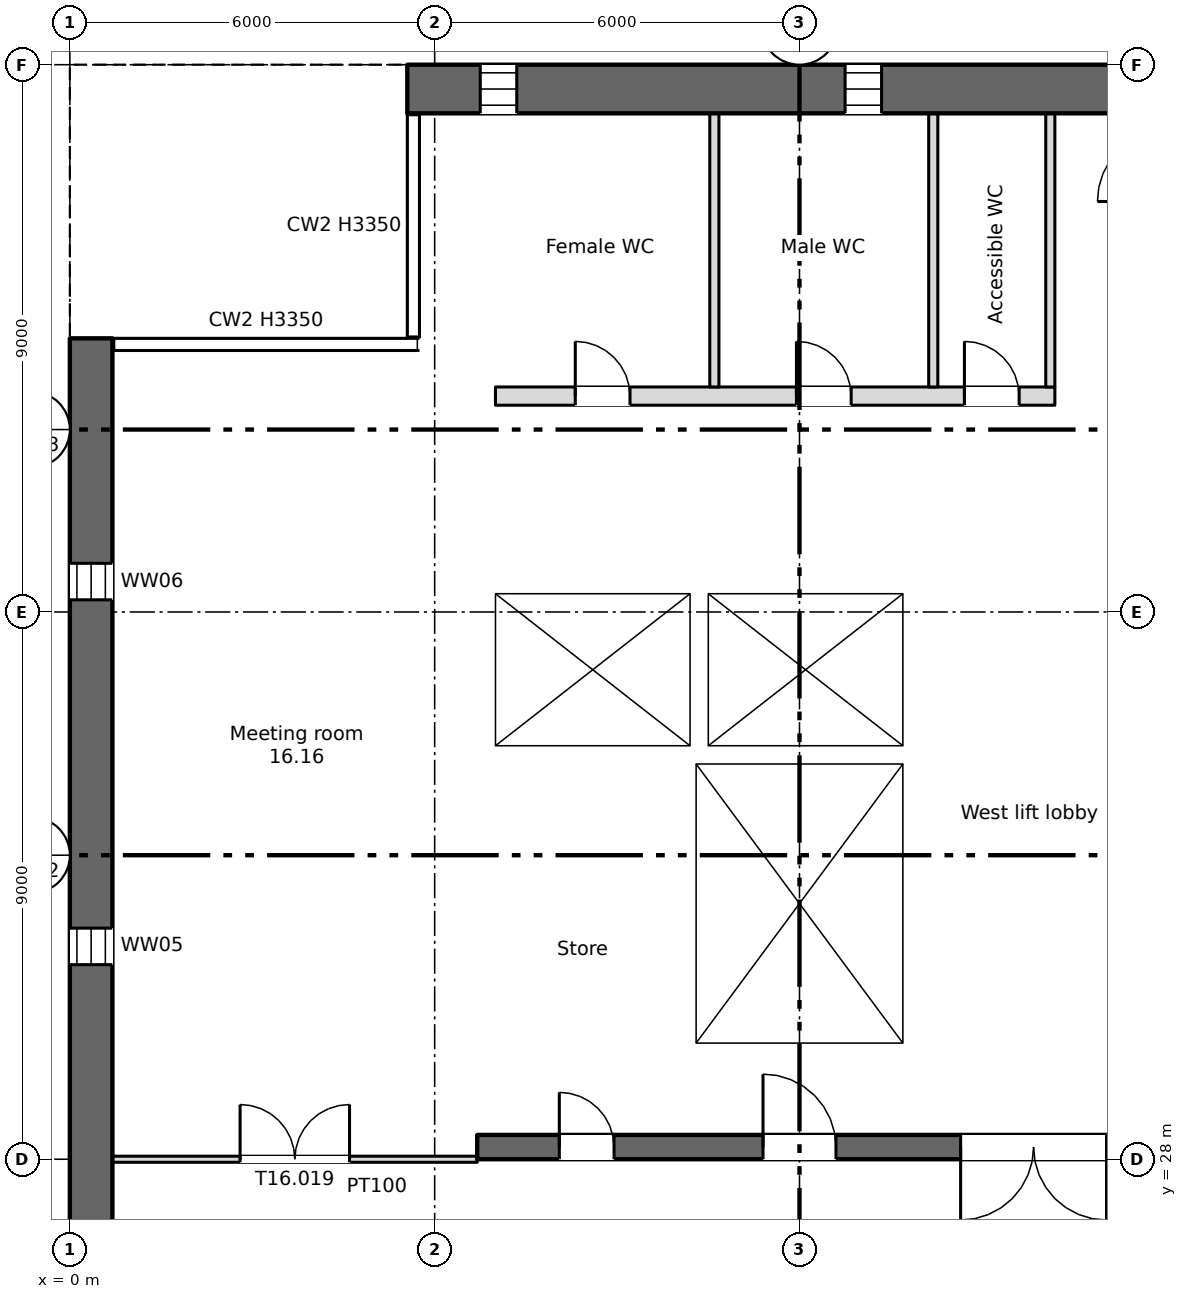
"""IFC4 building model, lengths in metres.
Left out: names, types, materials, properties, quantities, classifications, styles, units other than length and angle.
Written with IfcOpenShell. Run it as: python <this file> out.ifc"""

import sys

from ifc_helpers import new_model, si_unit, direction, frame, frame_2d, origin, place, context, subcontext, project, spatial, rectangle, extrude, element, fill, save


model = new_model("IFC4")
c1 = context("Model", 3, precision=1e-05, world=origin(), true_north=direction((0.0, 1.0)))
c2 = subcontext(c1, "Body", "Model", "MODEL_VIEW")
j1 = project(units=[si_unit("LENGTHUNIT", "METRE"), si_unit("PLANEANGLEUNIT", "RADIAN")], contexts=[c1])
p1 = place(None, origin())
s1 = spatial("IfcSite", under=j1, at=p1, CompositionType="ELEMENT")
p2 = place(p1, origin())
s2 = spatial("IfcBuilding", under=s1, at=p2, CompositionType="ELEMENT")
p3 = place(p2, frame((0.0, 0.0, 98.75)))
s3 = spatial("IfcBuildingStorey", under=s2, at=p3, CompositionType="ELEMENT", Elevation=98.75)
p4 = place(p3, frame((0.35, 6.0, 0.0), z_axis=(0.0, 0.0, 1.0), x_axis=(0.0, 1.0, 0.0)))
e1 = element("IfcWall", 1, at=p4, inside=s3, PredefinedType="SHEAR", context=c2, shape_type="SweptSolid", body=[
    extrude(rectangle(XDim=35.5, YDim=0.7, at=frame_2d((17.75, 0.0))), origin(), (0.0, 0.0, 1.0), 3.35),
])
p5 = place(p4, frame((1.2, 0.0, 0.6)))
e2 = element("IfcOpeningElement", 2, at=p5, cuts=e1, PredefinedType="OPENING", context=c2, shape_type="SweptSolid", body=[
    extrude(rectangle(XDim=0.6, YDim=2.4, at=frame_2d((0.3, 1.2))), frame((0.0, 0.36, 0.0), z_axis=(0.0, -1.0, 0.0), x_axis=(1.0, 0.0, 0.0)), (0.0, 0.0, 1.0), 0.72),
])
p6 = place(p4, frame((7.2, 0.0, 0.6)))
e3 = element("IfcOpeningElement", 3, at=p6, cuts=e1, PredefinedType="OPENING", context=c2, shape_type="SweptSolid", body=[
    extrude(rectangle(XDim=0.6, YDim=2.4, at=frame_2d((0.3, 1.2))), frame((0.0, 0.36, 0.0), z_axis=(0.0, -1.0, 0.0), x_axis=(1.0, 0.0, 0.0)), (0.0, 0.0, 1.0), 0.72),
])
p7 = place(p4, frame((13.2, 0.0, 0.6)))
e4 = element("IfcOpeningElement", 4, at=p7, cuts=e1, PredefinedType="OPENING", context=c2, shape_type="SweptSolid", body=[
    extrude(rectangle(XDim=0.6, YDim=2.4, at=frame_2d((0.3, 1.2))), frame((0.0, 0.36, 0.0), z_axis=(0.0, -1.0, 0.0), x_axis=(1.0, 0.0, 0.0)), (0.0, 0.0, 1.0), 0.72),
])
p8 = place(p4, frame((19.2, 0.0, 0.6)))
e5 = element("IfcOpeningElement", 5, at=p8, cuts=e1, PredefinedType="OPENING", context=c2, shape_type="SweptSolid", body=[
    extrude(rectangle(XDim=0.6, YDim=2.4, at=frame_2d((0.3, 1.2))), frame((0.0, 0.36, 0.0), z_axis=(0.0, -1.0, 0.0), x_axis=(1.0, 0.0, 0.0)), (0.0, 0.0, 1.0), 0.72),
])
p9 = place(p4, frame((25.2, 0.0, 0.6)))
e6 = element("IfcOpeningElement", 6, at=p9, cuts=e1, PredefinedType="OPENING", context=c2, shape_type="SweptSolid", body=[
    extrude(rectangle(XDim=0.6, YDim=2.4, at=frame_2d((0.3, 1.2))), frame((0.0, 0.36, 0.0), z_axis=(0.0, -1.0, 0.0), x_axis=(1.0, 0.0, 0.0)), (0.0, 0.0, 1.0), 0.72),
])
p10 = place(p4, frame((31.2, 0.0, 0.6)))
e7 = element("IfcOpeningElement", 7, at=p10, cuts=e1, PredefinedType="OPENING", context=c2, shape_type="SweptSolid", body=[
    extrude(rectangle(XDim=0.6, YDim=2.4, at=frame_2d((0.3, 1.2))), frame((0.0, 0.36, 0.0), z_axis=(0.0, -1.0, 0.0), x_axis=(1.0, 0.0, 0.0)), (0.0, 0.0, 1.0), 0.72),
])
p11 = place(p3, frame((5.55, 45.6, 0.0), z_axis=(0.0, 0.0, 1.0), x_axis=(1.0, 0.0, 0.0)))
e8 = element("IfcWall", 8, at=p11, inside=s3, PredefinedType="SHEAR", context=c2, shape_type="SweptSolid", body=[
    extrude(rectangle(XDim=60.9, YDim=0.8, at=frame_2d((30.45, 0.0))), origin(), (0.0, 0.0, 1.0), 3.35),
])
p12 = place(p11, frame((1.2, 0.0, 0.6)))
e9 = element("IfcOpeningElement", 9, at=p12, cuts=e8, PredefinedType="OPENING", context=c2, shape_type="SweptSolid", body=[
    extrude(rectangle(XDim=0.6, YDim=2.4, at=frame_2d((0.3, 1.2))), frame((0.0, 0.41, 0.0), z_axis=(0.0, -1.0, 0.0), x_axis=(1.0, 0.0, 0.0)), (0.0, 0.0, 1.0), 0.82),
])
p13 = place(p11, frame((7.2, 0.0, 0.6)))
e10 = element("IfcOpeningElement", 10, at=p13, cuts=e8, PredefinedType="OPENING", context=c2, shape_type="SweptSolid", body=[
    extrude(rectangle(XDim=0.6, YDim=2.4, at=frame_2d((0.3, 1.2))), frame((0.0, 0.41, 0.0), z_axis=(0.0, -1.0, 0.0), x_axis=(1.0, 0.0, 0.0)), (0.0, 0.0, 1.0), 0.82),
])
p14 = place(p3, frame((6.7, 28.2, 0.0), z_axis=(0.0, 0.0, 1.0), x_axis=(1.0, 0.0, 0.0)))
e11 = element("IfcWall", 11, at=p14, inside=s3, PredefinedType="SHEAR", context=c2, shape_type="SweptSolid", body=[
    extrude(rectangle(XDim=57.8, YDim=0.4, at=frame_2d((28.9, 0.0))), origin(), (0.0, 0.0, 1.0), 3.35),
])
p15 = place(p14, frame((13.85, 0.0, 0.0)))
e12 = element("IfcOpeningElement", 12, at=p15, cuts=e11, PredefinedType="OPENING", context=c2, shape_type="SweptSolid", body=[
    extrude(rectangle(XDim=0.9, YDim=2.1, at=frame_2d((0.45, 1.05))), frame((0.0, 0.21, 0.0), z_axis=(0.0, -1.0, 0.0), x_axis=(1.0, 0.0, 0.0)), (0.0, 0.0, 1.0), 0.42),
])
p16 = place(p14, frame((48.562, 0.0, 0.0)))
e13 = element("IfcOpeningElement", 13, at=p16, cuts=e11, PredefinedType="OPENING", context=c2, shape_type="SweptSolid", body=[
    extrude(rectangle(XDim=0.9, YDim=2.1, at=frame_2d((0.45, 1.05))), frame((0.0, 0.21, 0.0), z_axis=(0.0, -1.0, 0.0), x_axis=(1.0, 0.0, 0.0)), (0.0, 0.0, 1.0), 0.42),
])
p17 = place(p14, frame((51.137, 0.0, 0.0)))
e14 = element("IfcOpeningElement", 14, at=p17, cuts=e11, PredefinedType="OPENING", context=c2, shape_type="SweptSolid", body=[
    extrude(rectangle(XDim=0.9, YDim=2.1, at=frame_2d((0.45, 1.05))), frame((0.0, 0.21, 0.0), z_axis=(0.0, -1.0, 0.0), x_axis=(1.0, 0.0, 0.0)), (0.0, 0.0, 1.0), 0.42),
])
p18 = place(p14, frame((1.35, 0.0, 0.0)))
e15 = element("IfcOpeningElement", 15, at=p18, cuts=e11, PredefinedType="OPENING", context=c2, shape_type="SweptSolid", body=[
    extrude(rectangle(XDim=0.9, YDim=2.1, at=frame_2d((0.45, 1.05))), frame((0.0, 0.21, 0.0), z_axis=(0.0, -1.0, 0.0), x_axis=(1.0, 0.0, 0.0)), (0.0, 0.0, 1.0), 0.42),
])
p19 = place(p14, frame((4.7, 0.0, 0.0)))
e16 = element("IfcOpeningElement", 16, at=p19, cuts=e11, PredefinedType="OPENING", context=c2, shape_type="SweptSolid", body=[
    extrude(rectangle(XDim=1.2, YDim=2.1, at=frame_2d((0.6, 1.05))), frame((0.0, 0.21, 0.0), z_axis=(0.0, -1.0, 0.0), x_axis=(1.0, 0.0, 0.0)), (0.0, 0.0, 1.0), 0.42),
])
p20 = place(p14, frame((31.7, 0.0, 0.0)))
e17 = element("IfcOpeningElement", 17, at=p20, cuts=e11, PredefinedType="OPENING", context=c2, shape_type="SweptSolid", body=[
    extrude(rectangle(XDim=1.2, YDim=2.1, at=frame_2d((0.6, 1.05))), frame((0.0, 0.21, 0.0), z_axis=(0.0, -1.0, 0.0), x_axis=(1.0, 0.0, 0.0)), (0.0, 0.0, 1.0), 0.42),
])
p21 = place(p14, frame((55.2, 0.0, 0.0)))
e18 = element("IfcOpeningElement", 18, at=p21, cuts=e11, PredefinedType="OPENING", context=c2, shape_type="SweptSolid", body=[
    extrude(rectangle(XDim=1.2, YDim=2.1, at=frame_2d((0.6, 1.05))), frame((0.0, 0.21, 0.0), z_axis=(0.0, -1.0, 0.0), x_axis=(1.0, 0.0, 0.0)), (0.0, 0.0, 1.0), 0.42),
])
p22 = place(p14, frame((21.7, 0.0, 0.0)))
e19 = element("IfcOpeningElement", 19, at=p22, cuts=e11, PredefinedType="OPENING", context=c2, shape_type="SweptSolid", body=[
    extrude(rectangle(XDim=1.2, YDim=2.1, at=frame_2d((0.6, 1.05))), frame((0.0, 0.21, 0.0), z_axis=(0.0, -1.0, 0.0), x_axis=(1.0, 0.0, 0.0)), (0.0, 0.0, 1.0), 0.42),
])
p23 = place(p14, frame((41.7, 0.0, 0.0)))
e20 = element("IfcOpeningElement", 20, at=p23, cuts=e11, PredefinedType="OPENING", context=c2, shape_type="SweptSolid", body=[
    extrude(rectangle(XDim=1.2, YDim=2.1, at=frame_2d((0.6, 1.05))), frame((0.0, 0.21, 0.0), z_axis=(0.0, -1.0, 0.0), x_axis=(1.0, 0.0, 0.0)), (0.0, 0.0, 1.0), 0.42),
])
p24 = place(p14, frame((24.85, 0.0, 0.0)))
e21 = element("IfcOpeningElement", 21, at=p24, cuts=e11, PredefinedType="OPENING", context=c2, shape_type="SweptSolid", body=[
    extrude(rectangle(XDim=2.4, YDim=2.1, at=frame_2d((1.2, 1.05))), frame((0.0, 0.21, 0.0), z_axis=(0.0, -1.0, 0.0), x_axis=(1.0, 0.0, 0.0)), (0.0, 0.0, 1.0), 0.42),
])
p25 = place(p14, frame((37.35, 0.0, 0.0)))
e22 = element("IfcOpeningElement", 22, at=p25, cuts=e11, PredefinedType="OPENING", context=c2, shape_type="SweptSolid", body=[
    extrude(rectangle(XDim=2.4, YDim=2.1, at=frame_2d((1.2, 1.05))), frame((0.0, 0.21, 0.0), z_axis=(0.0, -1.0, 0.0), x_axis=(1.0, 0.0, 0.0)), (0.0, 0.0, 1.0), 0.42),
])
p26 = place(p14, frame((7.95, 0.0, 0.0)))
e23 = element("IfcOpeningElement", 23, at=p26, cuts=e11, PredefinedType="OPENING", context=c2, shape_type="SweptSolid", body=[
    extrude(rectangle(XDim=2.4, YDim=2.1, at=frame_2d((1.2, 1.05))), frame((0.0, 0.21, 0.0), z_axis=(0.0, -1.0, 0.0), x_axis=(1.0, 0.0, 0.0)), (0.0, 0.0, 1.0), 0.42),
])
p27 = place(p14, frame((28.85, 0.0, 0.0)))
e24 = element("IfcOpeningElement", 24, at=p27, cuts=e11, PredefinedType="OPENING", context=c2, shape_type="SweptSolid", body=[
    extrude(rectangle(XDim=0.9, YDim=2.1, at=frame_2d((0.45, 1.05))), frame((0.0, 0.21, 0.0), z_axis=(0.0, -1.0, 0.0), x_axis=(1.0, 0.0, 0.0)), (0.0, 0.0, 1.0), 0.42),
])
p28 = place(p14, frame((34.85, 0.0, 0.0)))
e25 = element("IfcOpeningElement", 25, at=p28, cuts=e11, PredefinedType="OPENING", context=c2, shape_type="SweptSolid", body=[
    extrude(rectangle(XDim=0.9, YDim=2.1, at=frame_2d((0.45, 1.05))), frame((0.0, 0.21, 0.0), z_axis=(0.0, -1.0, 0.0), x_axis=(1.0, 0.0, 0.0)), (0.0, 0.0, 1.0), 0.42),
])
p29 = place(p3, frame((6.85, 28.4, 0.0), z_axis=(0.0, 0.0, 1.0), x_axis=(0.0, 1.0, 0.0)))
e26 = element("IfcWall", 26, at=p29, inside=s3, PredefinedType="SHEAR", context=c2, shape_type="SweptSolid", body=[
    extrude(rectangle(XDim=16.8, YDim=0.3, at=frame_2d((8.4, 0.0))), origin(), (0.0, 0.0, 1.0), 3.35),
])
for number, where, z_axis, x_axis in (
    (27, (10.15, 28.4, 0.0), (0.0, 0.0, 1.0), (0.0, 1.0, 0.0)),
    (28, (13.85, 28.4, 0.0), (0.0, 0.0, 1.0), (0.0, 1.0, 0.0)),
):
    element("IfcWall", number, at=place(p3, frame(where, z_axis=z_axis, x_axis=x_axis)), inside=s3, PredefinedType="SHEAR", context=c2, shape_type="SweptSolid", body=[
        extrude(rectangle(XDim=6.1, YDim=0.3, at=frame_2d((3.05, 0.0))), origin(), (0.0, 0.0, 1.0), 3.35),
    ])
for number, where, z_axis, x_axis in (
    (29, (7.0, 34.65, 0.0), (0.0, 0.0, 1.0), (1.0, 0.0, 0.0)),
    (30, (7.0, 37.45, 0.0), (0.0, 0.0, 1.0), (1.0, 0.0, 0.0)),
):
    element("IfcWall", number, at=place(p3, frame(where, z_axis=z_axis, x_axis=x_axis)), inside=s3, PredefinedType="SHEAR", context=c2, shape_type="SweptSolid", body=[
        extrude(rectangle(XDim=7.0, YDim=0.3, at=frame_2d((3.5, 0.0))), origin(), (0.0, 0.0, 1.0), 3.35),
    ])
p30 = place(p3, frame((13.85, 34.8, 0.0), z_axis=(0.0, 0.0, 1.0), x_axis=(0.0, 1.0, 0.0)))
e31 = element("IfcWall", 31, at=p30, inside=s3, PredefinedType="SHEAR", context=c2, shape_type="SweptSolid", body=[
    extrude(rectangle(XDim=2.5, YDim=0.3, at=frame_2d((1.25, 0.0))), origin(), (0.0, 0.0, 1.0), 3.35),
])
p31 = place(p3, frame((7.0, 40.55, 0.0), z_axis=(0.0, 0.0, 1.0), x_axis=(1.0, 0.0, 0.0)))
e32 = element("IfcWall", 32, at=p31, inside=s3, PredefinedType="PARTITIONING", context=c2, shape_type="SweptSolid", body=[
    extrude(rectangle(XDim=9.2, YDim=0.3, at=frame_2d((4.6, 0.0))), origin(), (0.0, 0.0, 1.0), 3.35),
])
p32 = place(p31, frame((1.312, 0.0, 0.0)))
e33 = element("IfcOpeningElement", 33, at=p32, cuts=e32, PredefinedType="OPENING", context=c2, shape_type="SweptSolid", body=[
    extrude(rectangle(XDim=0.9, YDim=2.1, at=frame_2d((0.45, 1.05))), frame((0.0, 0.16, 0.0), z_axis=(0.0, -1.0, 0.0), x_axis=(1.0, 0.0, 0.0)), (0.0, 0.0, 1.0), 0.32),
])
p33 = place(p31, frame((4.95, 0.0, 0.0)))
e34 = element("IfcOpeningElement", 34, at=p33, cuts=e32, PredefinedType="OPENING", context=c2, shape_type="SweptSolid", body=[
    extrude(rectangle(XDim=0.9, YDim=2.1, at=frame_2d((0.45, 1.05))), frame((0.0, 0.16, 0.0), z_axis=(0.0, -1.0, 0.0), x_axis=(1.0, 0.0, 0.0)), (0.0, 0.0, 1.0), 0.32),
])
p34 = place(p31, frame((7.712, 0.0, 0.0)))
e35 = element("IfcOpeningElement", 35, at=p34, cuts=e32, PredefinedType="OPENING", context=c2, shape_type="SweptSolid", body=[
    extrude(rectangle(XDim=0.9, YDim=2.1, at=frame_2d((0.45, 1.05))), frame((0.0, 0.16, 0.0), z_axis=(0.0, -1.0, 0.0), x_axis=(1.0, 0.0, 0.0)), (0.0, 0.0, 1.0), 0.32),
])
p35 = place(p3, frame((10.35, 34.8, 0.0), z_axis=(0.0, 0.0, 1.0), x_axis=(0.0, 1.0, 0.0)))
e36 = element("IfcWall", 36, at=p35, inside=s3, PredefinedType="SHEAR", context=c2, shape_type="SweptSolid", body=[
    extrude(rectangle(XDim=2.5, YDim=0.3, at=frame_2d((1.25, 0.0))), origin(), (0.0, 0.0, 1.0), 3.35),
])
for number, where, z_axis, x_axis in (
    (37, (16.125, 40.7, 0.0), (0.0, 0.0, 1.0), (0.0, 1.0, 0.0)),
    (38, (10.6, 40.7, 0.0), (0.0, 0.0, 1.0), (0.0, 1.0, 0.0)),
    (39, (14.2, 40.7, 0.0), (0.0, 0.0, 1.0), (0.0, 1.0, 0.0)),
):
    element("IfcWall", number, at=place(p3, frame(where, z_axis=z_axis, x_axis=x_axis)), inside=s3, PredefinedType="PARTITIONING", context=c2, shape_type="SweptSolid", body=[
        extrude(rectangle(XDim=4.5, YDim=0.15, at=frame_2d((2.25, 0.0))), origin(), (0.0, 0.0, 1.0), 3.35),
    ])
p36 = place(p3, frame((0.7, 28.0, 0.0), z_axis=(0.0, 0.0, 1.0), x_axis=(1.0, 0.0, 0.0)))
e40 = element("IfcWall", 40, at=p36, inside=s3, PredefinedType="PARTITIONING", context=c2, shape_type="SweptSolid", body=[
    extrude(rectangle(XDim=6.0, YDim=0.1, at=frame_2d((3.0, 0.0))), origin(), (0.0, 0.0, 1.0), 3.35),
])
p37 = place(p36, frame((2.1, 0.0, 0.0)))
e41 = element("IfcOpeningElement", 41, at=p37, cuts=e40, PredefinedType="OPENING", context=c2, shape_type="SweptSolid", body=[
    extrude(rectangle(XDim=1.8, YDim=2.1, at=frame_2d((0.9, 1.05))), frame((0.0, 0.06, 0.0), z_axis=(0.0, -1.0, 0.0), x_axis=(1.0, 0.0, 0.0)), (0.0, 0.0, 1.0), 0.12),
])
p38 = place(p12, origin())
e42 = element("IfcWindow", 42, at=p38, inside=s3, PartitioningType="SINGLE_PANEL", PredefinedType="WINDOW", context=c2, shape_type="SweptSolid", body=[
    extrude(rectangle(XDim=0.6, YDim=2.4, at=frame_2d((0.3, 1.2))), frame((0.0, 0.03, 0.0), z_axis=(0.0, -1.0, 0.0), x_axis=(1.0, 0.0, 0.0)), (0.0, 0.0, 1.0), 0.06),
])
fill(e9, e42)
p39 = place(p13, origin())
e43 = element("IfcWindow", 43, at=p39, inside=s3, PartitioningType="SINGLE_PANEL", PredefinedType="WINDOW", context=c2, shape_type="SweptSolid", body=[
    extrude(rectangle(XDim=0.6, YDim=2.4, at=frame_2d((0.3, 1.2))), frame((0.0, 0.03, 0.0), z_axis=(0.0, -1.0, 0.0), x_axis=(1.0, 0.0, 0.0)), (0.0, 0.0, 1.0), 0.06),
])
fill(e10, e43)
p40 = place(p9, origin())
e44 = element("IfcWindow", 44, at=p40, inside=s3, PartitioningType="SINGLE_PANEL", PredefinedType="WINDOW", context=c2, shape_type="SweptSolid", body=[
    extrude(rectangle(XDim=0.6, YDim=2.4, at=frame_2d((0.3, 1.2))), frame((0.0, 0.03, 0.0), z_axis=(0.0, -1.0, 0.0), x_axis=(1.0, 0.0, 0.0)), (0.0, 0.0, 1.0), 0.06),
])
fill(e6, e44)
p41 = place(p10, origin())
e45 = element("IfcWindow", 45, at=p41, inside=s3, PartitioningType="SINGLE_PANEL", PredefinedType="WINDOW", context=c2, shape_type="SweptSolid", body=[
    extrude(rectangle(XDim=0.6, YDim=2.4, at=frame_2d((0.3, 1.2))), frame((0.0, 0.03, 0.0), z_axis=(0.0, -1.0, 0.0), x_axis=(1.0, 0.0, 0.0)), (0.0, 0.0, 1.0), 0.06),
])
fill(e7, e45)
p42 = place(p18, origin())
e46 = element("IfcDoor", 46, at=p42, inside=s3, OperationType="SINGLE_SWING_LEFT", PredefinedType="DOOR", context=c2, shape_type="SweptSolid", body=[
    extrude(rectangle(XDim=0.9, YDim=2.1, at=frame_2d((0.45, 1.05))), frame((0.0, 0.025, 0.0), z_axis=(0.0, -1.0, 0.0), x_axis=(1.0, 0.0, 0.0)), (0.0, 0.0, 1.0), 0.05),
])
fill(e15, e46)
p43 = place(p32, origin())
e47 = element("IfcDoor", 47, at=p43, inside=s3, OperationType="SINGLE_SWING_LEFT", PredefinedType="DOOR", context=c2, shape_type="SweptSolid", body=[
    extrude(rectangle(XDim=0.9, YDim=2.1, at=frame_2d((0.45, 1.05))), frame((0.0, 0.025, 0.0), z_axis=(0.0, -1.0, 0.0), x_axis=(1.0, 0.0, 0.0)), (0.0, 0.0, 1.0), 0.05),
])
fill(e33, e47)
p44 = place(p33, origin())
e48 = element("IfcDoor", 48, at=p44, inside=s3, OperationType="SINGLE_SWING_LEFT", PredefinedType="DOOR", context=c2, shape_type="SweptSolid", body=[
    extrude(rectangle(XDim=0.9, YDim=2.1, at=frame_2d((0.45, 1.05))), frame((0.0, 0.025, 0.0), z_axis=(0.0, -1.0, 0.0), x_axis=(1.0, 0.0, 0.0)), (0.0, 0.0, 1.0), 0.05),
])
fill(e34, e48)
p45 = place(p34, origin())
e49 = element("IfcDoor", 49, at=p45, inside=s3, OperationType="SINGLE_SWING_LEFT", PredefinedType="DOOR", context=c2, shape_type="SweptSolid", body=[
    extrude(rectangle(XDim=0.9, YDim=2.1, at=frame_2d((0.45, 1.05))), frame((0.0, 0.025, 0.0), z_axis=(0.0, -1.0, 0.0), x_axis=(1.0, 0.0, 0.0)), (0.0, 0.0, 1.0), 0.05),
])
fill(e35, e49)
p46 = place(p19, origin())
e50 = element("IfcDoor", 50, at=p46, inside=s3, OperationType="SINGLE_SWING_LEFT", PredefinedType="DOOR", context=c2, shape_type="SweptSolid", body=[
    extrude(rectangle(XDim=1.2, YDim=2.1, at=frame_2d((0.6, 1.05))), frame((0.0, 0.025, 0.0), z_axis=(0.0, -1.0, 0.0), x_axis=(1.0, 0.0, 0.0)), (0.0, 0.0, 1.0), 0.05),
])
fill(e16, e50)
p47 = place(p26, origin())
e51 = element("IfcDoor", 51, at=p47, inside=s3, OperationType="DOUBLE_DOOR_SINGLE_SWING", PredefinedType="DOOR", context=c2, shape_type="SweptSolid", body=[
    extrude(rectangle(XDim=2.4, YDim=2.1, at=frame_2d((1.2, 1.05))), frame((0.0, 0.025, 0.0), z_axis=(0.0, -1.0, 0.0), x_axis=(1.0, 0.0, 0.0)), (0.0, 0.0, 1.0), 0.05),
])
fill(e23, e51)
p48 = place(p37, origin())
e52 = element("IfcDoor", 52, at=p48, inside=s3, OperationType="DOUBLE_DOOR_SINGLE_SWING", PredefinedType="DOOR", context=c2, shape_type="SweptSolid", body=[
    extrude(rectangle(XDim=1.8, YDim=2.1, at=frame_2d((0.9, 1.05))), frame((0.0, 0.025, 0.0), z_axis=(0.0, -1.0, 0.0), x_axis=(1.0, 0.0, 0.0)), (0.0, 0.0, 1.0), 0.05),
])
fill(e41, e52)
save(model, sys.argv[1])
